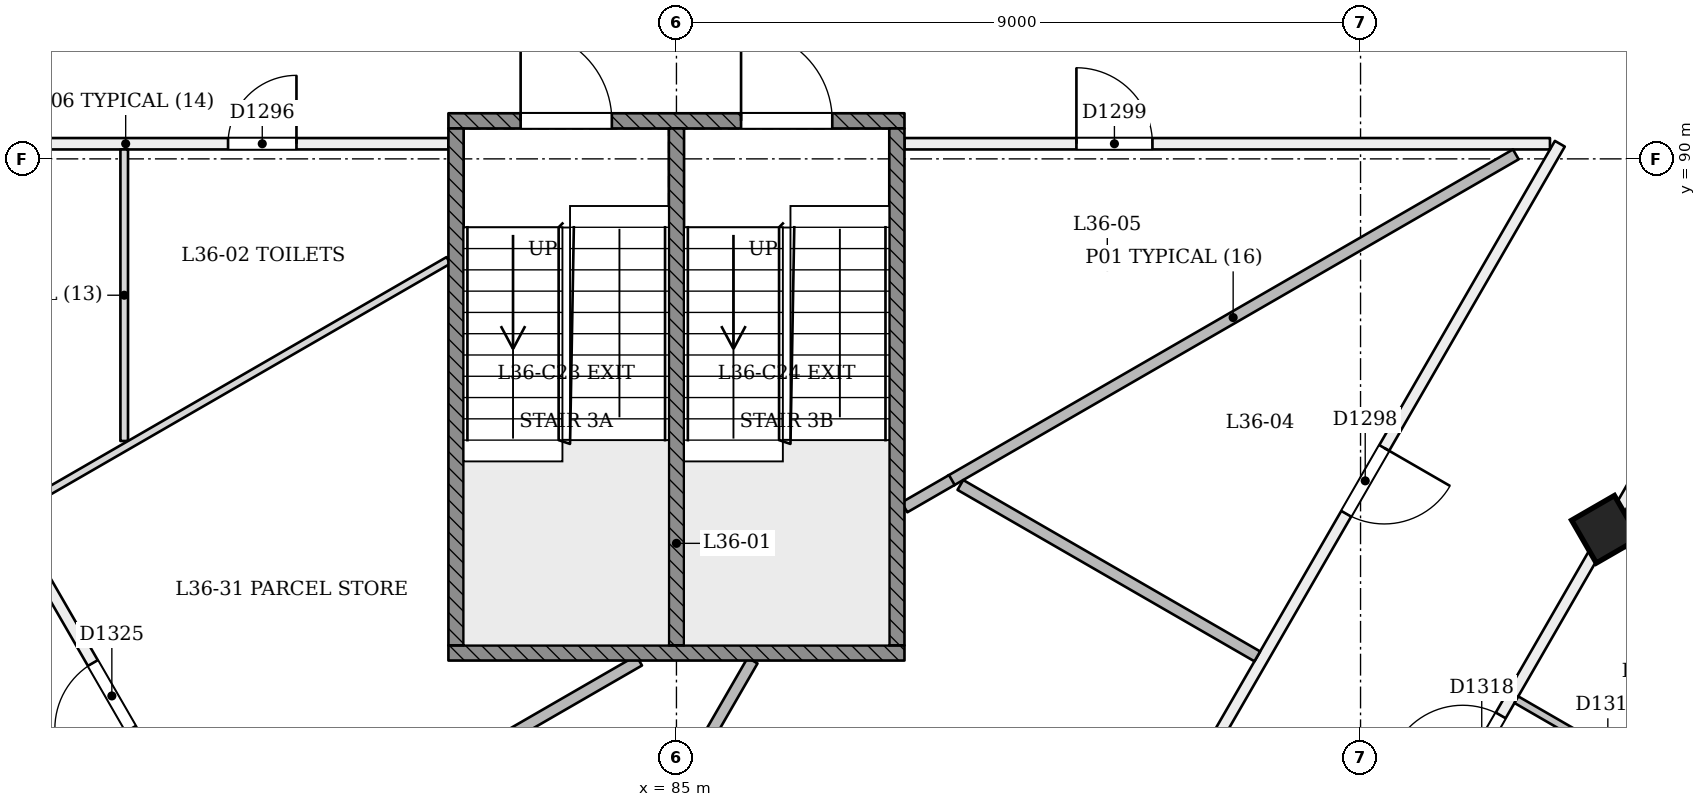
"""IFC4 building model, lengths in metres.
Left out: names, types, materials, properties, quantities, classifications, styles, units other than length and angle.
Written with IfcOpenShell. Run it as: python <this file> out.ifc"""

import sys

from ifc_helpers import new_model, si_unit, direction, frame, frame_2d, origin, origin_2d, place, context, subcontext, project, spatial, rectangle, extrude, element, fill, save


model = new_model("IFC4")
c1 = context("Model", 3, precision=1e-05, world=origin(), true_north=direction((0.0, 1.0)))
c2 = subcontext(c1, "Body", "Model", "MODEL_VIEW")
j1 = project(units=[si_unit("LENGTHUNIT", "METRE"), si_unit("PLANEANGLEUNIT", "RADIAN")], contexts=[c1])
p1 = place(None, origin())
s1 = spatial("IfcSite", under=j1, at=p1, CompositionType="ELEMENT")
p2 = place(p1, origin())
s2 = spatial("IfcBuilding", under=s1, at=p2, CompositionType="ELEMENT")
p3 = place(p2, frame((0.0, 0.0, 142.2)))
s3 = spatial("IfcBuildingStorey", under=s2, at=p3, CompositionType="ELEMENT", Elevation=142.2)
p4 = place(p3, frame((97.248, 85.08, -0.02), z_axis=(-0.02215369191, 0.038413282303, 0.999016333038), x_axis=(-0.500652774743, -0.865364202149, 0.022171981912)))
e1 = element("IfcColumn", 1, at=p4, inside=s3, PredefinedType="COLUMN", context=c2, shape_type="SweptSolid", body=[
    extrude(rectangle(XDim=0.65, YDim=0.65, at=origin_2d()), origin(), (0.0, 0.0, 1.0), 3.604),
])
p5 = place(p3, frame((73.508, 90.199, 0.0), z_axis=(0.0, 0.0, 1.0), x_axis=(1.0, 0.0, 0.0)))
e2 = element("IfcWall", 2, at=p5, inside=s3, PredefinedType="PARTITIONING", context=c2, shape_type="SweptSolid", body=[
    extrude(rectangle(XDim=8.492, YDim=0.15, at=frame_2d((4.246, 0.0))), origin(), (0.0, 0.0, 1.0), 3.15),
])
p6 = place(p5, frame((5.593, 0.0, 0.0)))
e3 = element("IfcOpeningElement", 3, at=p6, cuts=e2, PredefinedType="OPENING", context=c2, shape_type="SweptSolid", body=[
    extrude(rectangle(XDim=0.9, YDim=2.1, at=frame_2d((0.45, 1.05))), frame((0.0, 0.085, 0.0), z_axis=(0.0, -1.0, 0.0), x_axis=(1.0, 0.0, 0.0)), (0.0, 0.0, 1.0), 0.171),
])
p7 = place(p3, frame((96.622, 90.199, 0.0), z_axis=(0.0, 0.0, 1.0), x_axis=(-0.49999793811, -0.866026594214, 0.0)))
e4 = element("IfcWall", 4, at=p7, inside=s3, PredefinedType="PARTITIONING", context=c2, shape_type="SweptSolid", body=[
    extrude(rectangle(XDim=23.244, YDim=0.15, at=frame_2d((11.622, 0.0))), origin(), (0.0, 0.0, 1.0), 3.15),
])
p8 = place(p7, frame((4.621, 0.0, 0.0)))
e5 = element("IfcOpeningElement", 5, at=p8, cuts=e4, PredefinedType="OPENING", context=c2, shape_type="SweptSolid", body=[
    extrude(rectangle(XDim=1.0, YDim=2.1, at=frame_2d((0.5, 1.05))), frame((0.0, 0.085, 0.0), z_axis=(0.0, -1.0, 0.0), x_axis=(1.0, 0.0, 0.0)), (0.0, 0.0, 1.0), 0.171),
])
p9 = place(p7, frame((10.348, 0.0, 0.0)))
e6 = element("IfcOpeningElement", 6, at=p9, cuts=e4, PredefinedType="OPENING", context=c2, shape_type="SweptSolid", body=[
    extrude(rectangle(XDim=1.2, YDim=2.1, at=frame_2d((0.6, 1.05))), frame((0.0, 0.085, 0.0), z_axis=(0.0, -1.0, 0.0), x_axis=(1.0, 0.0, 0.0)), (0.0, 0.0, 1.0), 0.171),
])
p10 = place(p7, frame((15.389, 0.0, 0.0)))
e7 = element("IfcOpeningElement", 7, at=p10, cuts=e4, PredefinedType="OPENING", context=c2, shape_type="SweptSolid", body=[
    extrude(rectangle(XDim=1.0, YDim=2.1, at=frame_2d((0.5, 1.05))), frame((0.0, 0.085, 0.0), z_axis=(0.0, -1.0, 0.0), x_axis=(1.0, 0.0, 0.0)), (0.0, 0.0, 1.0), 0.171),
])
p11 = place(p7, frame((19.423, 0.0, 0.0)))
e8 = element("IfcOpeningElement", 8, at=p11, cuts=e4, PredefinedType="OPENING", context=c2, shape_type="SweptSolid", body=[
    extrude(rectangle(XDim=1.0, YDim=2.1, at=frame_2d((0.5, 1.05))), frame((0.0, 0.085, 0.0), z_axis=(0.0, -1.0, 0.0), x_axis=(1.0, 0.0, 0.0)), (0.0, 0.0, 1.0), 0.171),
])
p12 = place(p3, frame((88.0, 90.199, 0.0), z_axis=(0.0, 0.0, 1.0), x_axis=(1.0, 0.0, 0.0)))
e9 = element("IfcWall", 9, at=p12, inside=s3, PredefinedType="PARTITIONING", context=c2, shape_type="SweptSolid", body=[
    extrude(rectangle(XDim=8.492, YDim=0.15, at=frame_2d((4.246, 0.0))), origin(), (0.0, 0.0, 1.0), 3.15),
])
p13 = place(p12, frame((2.262, 0.0, 0.0)))
e10 = element("IfcOpeningElement", 10, at=p13, cuts=e9, PredefinedType="OPENING", context=c2, shape_type="SweptSolid", body=[
    extrude(rectangle(XDim=1.0, YDim=2.1, at=frame_2d((0.5, 1.05))), frame((0.0, 0.085, 0.0), z_axis=(0.0, -1.0, 0.0), x_axis=(1.0, 0.0, 0.0)), (0.0, 0.0, 1.0), 0.171),
])
p14 = place(p3, frame((64.449, 99.517, 0.0), z_axis=(0.0, 0.0, 1.0), x_axis=(0.499425839766, -0.866356641675, 0.0)))
e11 = element("IfcWall", 11, at=p14, inside=s3, PredefinedType="PARTITIONING", context=c2, shape_type="SweptSolid", body=[
    extrude(rectangle(XDim=41.118, YDim=0.15, at=frame_2d((20.559, 0.0))), origin(), (0.0, 0.0, 1.0), 2.75),
])
p15 = place(p14, frame((0.951, 0.0, 0.0)))
e12 = element("IfcOpeningElement", 12, at=p15, cuts=e11, PredefinedType="OPENING", context=c2, shape_type="SweptSolid", body=[
    extrude(rectangle(XDim=1.2, YDim=2.1, at=frame_2d((0.6, 1.05))), frame((0.0, 0.085, 0.0), z_axis=(0.0, -1.0, 0.0), x_axis=(1.0, 0.0, 0.0)), (0.0, 0.0, 1.0), 0.171),
])
p16 = place(p14, frame((10.552, 0.0, 0.0)))
e13 = element("IfcOpeningElement", 13, at=p16, cuts=e11, PredefinedType="OPENING", context=c2, shape_type="SweptSolid", body=[
    extrude(rectangle(XDim=1.0, YDim=2.1, at=frame_2d((0.5, 1.05))), frame((0.0, 0.085, 0.0), z_axis=(0.0, -1.0, 0.0), x_axis=(1.0, 0.0, 0.0)), (0.0, 0.0, 1.0), 0.171),
])
p17 = place(p14, frame((12.762, 0.0, 0.0)))
e14 = element("IfcOpeningElement", 14, at=p17, cuts=e11, PredefinedType="OPENING", context=c2, shape_type="SweptSolid", body=[
    extrude(rectangle(XDim=1.0, YDim=2.1, at=frame_2d((0.5, 1.05))), frame((0.0, 0.085, 0.0), z_axis=(0.0, -1.0, 0.0), x_axis=(1.0, 0.0, 0.0)), (0.0, 0.0, 1.0), 0.171),
])
p18 = place(p14, frame((20.557, 0.0, 0.0)))
e15 = element("IfcOpeningElement", 15, at=p18, cuts=e11, PredefinedType="OPENING", context=c2, shape_type="SweptSolid", body=[
    extrude(rectangle(XDim=1.2, YDim=2.1, at=frame_2d((0.6, 1.05))), frame((0.0, 0.085, 0.0), z_axis=(0.0, -1.0, 0.0), x_axis=(1.0, 0.0, 0.0)), (0.0, 0.0, 1.0), 0.171),
])
p19 = place(p14, frame((28.436, 0.0, 0.0)))
e16 = element("IfcOpeningElement", 16, at=p19, cuts=e11, PredefinedType="OPENING", context=c2, shape_type="SweptSolid", body=[
    extrude(rectangle(XDim=1.0, YDim=2.1, at=frame_2d((0.5, 1.05))), frame((0.0, 0.085, 0.0), z_axis=(0.0, -1.0, 0.0), x_axis=(1.0, 0.0, 0.0)), (0.0, 0.0, 1.0), 0.171),
])
p20 = place(p14, frame((32.957, 0.0, 0.0)))
e17 = element("IfcOpeningElement", 17, at=p20, cuts=e11, PredefinedType="OPENING", context=c2, shape_type="SweptSolid", body=[
    extrude(rectangle(XDim=1.2, YDim=2.1, at=frame_2d((0.6, 1.05))), frame((0.0, 0.085, 0.0), z_axis=(0.0, -1.0, 0.0), x_axis=(1.0, 0.0, 0.0)), (0.0, 0.0, 1.0), 0.171),
])
p21 = place(p14, frame((39.53, 0.0, 0.0)))
e18 = element("IfcOpeningElement", 18, at=p21, cuts=e11, PredefinedType="OPENING", context=c2, shape_type="SweptSolid", body=[
    extrude(rectangle(XDim=1.0, YDim=2.1, at=frame_2d((0.5, 1.05))), frame((0.0, 0.085, 0.0), z_axis=(0.0, -1.0, 0.0), x_axis=(1.0, 0.0, 0.0)), (0.0, 0.0, 1.0), 0.171),
])
p22 = place(p3, frame((85.065, 63.98, 0.0), z_axis=(0.0, 0.0, 1.0), x_axis=(0.499427357949, 0.866355766491, 0.0)))
e19 = element("IfcWall", 19, at=p22, inside=s3, PredefinedType="PARTITIONING", context=c2, shape_type="SweptSolid", body=[
    extrude(rectangle(XDim=41.02, YDim=0.15, at=frame_2d((20.51, 0.0))), origin(), (0.0, 0.0, 1.0), 2.75),
])
p23 = place(p22, frame((0.382, 0.0, 0.0)))
e20 = element("IfcOpeningElement", 20, at=p23, cuts=e19, PredefinedType="OPENING", context=c2, shape_type="SweptSolid", body=[
    extrude(rectangle(XDim=1.2, YDim=2.1, at=frame_2d((0.6, 1.05))), frame((0.0, 0.085, 0.0), z_axis=(0.0, -1.0, 0.0), x_axis=(1.0, 0.0, 0.0)), (0.0, 0.0, 1.0), 0.171),
])
p24 = place(p22, frame((2.583, 0.0, 0.0)))
e21 = element("IfcOpeningElement", 21, at=p24, cuts=e19, PredefinedType="OPENING", context=c2, shape_type="SweptSolid", body=[
    extrude(rectangle(XDim=1.0, YDim=2.1, at=frame_2d((0.5, 1.05))), frame((0.0, 0.085, 0.0), z_axis=(0.0, -1.0, 0.0), x_axis=(1.0, 0.0, 0.0)), (0.0, 0.0, 1.0), 0.171),
])
p25 = place(p22, frame((8.113, 0.0, 0.0)))
e22 = element("IfcOpeningElement", 22, at=p25, cuts=e19, PredefinedType="OPENING", context=c2, shape_type="SweptSolid", body=[
    extrude(rectangle(XDim=1.0, YDim=2.1, at=frame_2d((0.5, 1.05))), frame((0.0, 0.085, 0.0), z_axis=(0.0, -1.0, 0.0), x_axis=(1.0, 0.0, 0.0)), (0.0, 0.0, 1.0), 0.171),
])
p26 = place(p22, frame((11.467, 0.0, 0.0)))
e23 = element("IfcOpeningElement", 23, at=p26, cuts=e19, PredefinedType="OPENING", context=c2, shape_type="SweptSolid", body=[
    extrude(rectangle(XDim=1.0, YDim=2.1, at=frame_2d((0.5, 1.05))), frame((0.0, 0.085, 0.0), z_axis=(0.0, -1.0, 0.0), x_axis=(1.0, 0.0, 0.0)), (0.0, 0.0, 1.0), 0.171),
])
p27 = place(p22, frame((18.142, 0.0, 0.0)))
e24 = element("IfcOpeningElement", 24, at=p27, cuts=e19, PredefinedType="OPENING", context=c2, shape_type="SweptSolid", body=[
    extrude(rectangle(XDim=1.0, YDim=2.1, at=frame_2d((0.5, 1.05))), frame((0.0, 0.085, 0.0), z_axis=(0.0, -1.0, 0.0), x_axis=(1.0, 0.0, 0.0)), (0.0, 0.0, 1.0), 0.171),
])
p28 = place(p22, frame((20.583, 0.0, 0.0)))
e25 = element("IfcOpeningElement", 25, at=p28, cuts=e19, PredefinedType="OPENING", context=c2, shape_type="SweptSolid", body=[
    extrude(rectangle(XDim=1.0, YDim=2.1, at=frame_2d((0.5, 1.05))), frame((0.0, 0.085, 0.0), z_axis=(0.0, -1.0, 0.0), x_axis=(1.0, 0.0, 0.0)), (0.0, 0.0, 1.0), 0.171),
])
p29 = place(p22, frame((26.113, 0.0, 0.0)))
e26 = element("IfcOpeningElement", 26, at=p29, cuts=e19, PredefinedType="OPENING", context=c2, shape_type="SweptSolid", body=[
    extrude(rectangle(XDim=1.0, YDim=2.1, at=frame_2d((0.5, 1.05))), frame((0.0, 0.085, 0.0), z_axis=(0.0, -1.0, 0.0), x_axis=(1.0, 0.0, 0.0)), (0.0, 0.0, 1.0), 0.171),
])
p30 = place(p22, frame((33.863, 0.0, 0.0)))
e27 = element("IfcOpeningElement", 27, at=p30, cuts=e19, PredefinedType="OPENING", context=c2, shape_type="SweptSolid", body=[
    extrude(rectangle(XDim=1.2, YDim=2.1, at=frame_2d((0.6, 1.05))), frame((0.0, 0.085, 0.0), z_axis=(0.0, -1.0, 0.0), x_axis=(1.0, 0.0, 0.0)), (0.0, 0.0, 1.0), 0.171),
])
p31 = place(p22, frame((39.545, 0.0, 0.0)))
e28 = element("IfcOpeningElement", 28, at=p31, cuts=e19, PredefinedType="OPENING", context=c2, shape_type="SweptSolid", body=[
    extrude(rectangle(XDim=1.2, YDim=2.1, at=frame_2d((0.6, 1.05))), frame((0.0, 0.085, 0.0), z_axis=(0.0, -1.0, 0.0), x_axis=(1.0, 0.0, 0.0)), (0.0, 0.0, 1.0), 0.171),
])
p32 = place(p3, frame((84.935, 70.181, 0.0), z_axis=(0.0, 0.0, 1.0), x_axis=(-0.499999181911, 0.866025876108, 0.0)))
e29 = element("IfcWall", 29, at=p32, inside=s3, PredefinedType="PARTITIONING", context=c2, shape_type="SweptSolid", body=[
    extrude(rectangle(XDim=23.114, YDim=0.15, at=frame_2d((11.557, 0.0))), origin(), (0.0, 0.0, 1.0), 3.15),
])
p33 = place(p32, frame((19.637, 0.0, 0.0)))
e30 = element("IfcOpeningElement", 30, at=p33, cuts=e29, PredefinedType="OPENING", context=c2, shape_type="SweptSolid", body=[
    extrude(rectangle(XDim=0.9, YDim=2.1, at=frame_2d((0.45, 1.05))), frame((0.0, 0.085, 0.0), z_axis=(0.0, -1.0, 0.0), x_axis=(1.0, 0.0, 0.0)), (0.0, 0.0, 1.0), 0.171),
])
p34 = place(p32, frame((14.226, 0.0, 0.0)))
e31 = element("IfcOpeningElement", 31, at=p34, cuts=e29, PredefinedType="OPENING", context=c2, shape_type="SweptSolid", body=[
    extrude(rectangle(XDim=1.0, YDim=2.1, at=frame_2d((0.5, 1.05))), frame((0.0, 0.085, 0.0), z_axis=(0.0, -1.0, 0.0), x_axis=(1.0, 0.0, 0.0)), (0.0, 0.0, 1.0), 0.171),
])
p35 = place(p32, frame((9.397, 0.0, 0.0)))
e32 = element("IfcOpeningElement", 32, at=p35, cuts=e29, PredefinedType="OPENING", context=c2, shape_type="SweptSolid", body=[
    extrude(rectangle(XDim=1.0, YDim=2.1, at=frame_2d((0.5, 1.05))), frame((0.0, 0.085, 0.0), z_axis=(0.0, -1.0, 0.0), x_axis=(1.0, 0.0, 0.0)), (0.0, 0.0, 1.0), 0.171),
])
p36 = place(p3, frame((77.735, 90.124, 0.0), z_axis=(0.0, 0.0, 1.0), x_axis=(0.0, -1.0, 0.0)))
e33 = element("IfcWall", 33, at=p36, inside=s3, PredefinedType="PARTITIONING", context=c2, shape_type="SweptSolid", body=[
    extrude(rectangle(XDim=3.836, YDim=0.1, at=frame_2d((1.918, 0.0))), origin(), (0.0, 0.0, 1.0), 3.15),
])
p37 = place(p3, frame((76.263, 85.352, 0.0), z_axis=(0.0, 0.0, 1.0), x_axis=(0.866027860944, 0.49999574405, 0.0)))
e34 = element("IfcWall", 34, at=p37, inside=s3, PredefinedType="PARTITIONING", context=c2, shape_type="SweptSolid", body=[
    extrude(rectangle(XDim=6.625, YDim=0.1, at=frame_2d((3.312, 0.0))), origin(), (0.0, 0.0, 1.0), 3.15),
])
p38 = place(p3, frame((96.043, 90.059, 0.0), z_axis=(0.0, 0.0, 1.0), x_axis=(-0.86602320337, -0.50000381121, 0.0)))
e35 = element("IfcWall", 35, at=p38, inside=s3, PredefinedType="PARTITIONING", context=c2, shape_type="SweptSolid", body=[
    extrude(rectangle(XDim=8.588, YDim=0.15, at=frame_2d((4.294, 0.0))), origin(), (0.0, 0.0, 1.0), 3.15),
])
p39 = place(p3, frame((88.735, 85.71, 0.0), z_axis=(0.0, 0.0, 1.0), x_axis=(0.866029661101, -0.499992626039, 0.0)))
e36 = element("IfcWall", 36, at=p39, inside=s3, PredefinedType="PARTITIONING", context=c2, shape_type="SweptSolid", body=[
    extrude(rectangle(XDim=4.511, YDim=0.15, at=frame_2d((2.255, 0.0))), origin(), (0.0, 0.0, 1.0), 3.15),
])
p40 = place(p3, frame((88.0, 85.416, 0.0), z_axis=(0.0, 0.0, 1.0), x_axis=(0.865999022067, 0.500045691691, 0.0)))
e37 = element("IfcWall", 37, at=p40, inside=s3, PredefinedType="PARTITIONING", context=c2, shape_type="SweptSolid", body=[
    extrude(rectangle(XDim=0.719, YDim=0.15, at=frame_2d((0.36, 0.0))), origin(), (0.0, 0.0, 1.0), 3.15),
])
p41 = place(p3, frame((98.509, 81.466, 0.0), z_axis=(0.0, 0.0, 1.0), x_axis=(-0.866049574308, 0.499958133088, 0.0)))
e38 = element("IfcWall", 38, at=p41, inside=s3, PredefinedType="PARTITIONING", context=c2, shape_type="SweptSolid", body=[
    extrude(rectangle(XDim=2.84, YDim=0.1, at=frame_2d((1.42, 0.0))), origin(), (0.0, 0.0, 1.0), 3.15),
])
p42 = place(p41, frame((1.0, 0.0, 0.0)))
e39 = element("IfcOpeningElement", 39, at=p42, cuts=e38, PredefinedType="OPENING", context=c2, shape_type="SweptSolid", body=[
    extrude(rectangle(XDim=0.9, YDim=2.1, at=frame_2d((0.45, 1.05))), frame((0.0, 0.061, 0.0), z_axis=(0.0, -1.0, 0.0), x_axis=(1.0, 0.0, 0.0)), (0.0, 0.0, 1.0), 0.121),
])
p43 = place(p3, frame((102.79, 81.881, 0.0), z_axis=(0.0, 0.0, 1.0), x_axis=(-0.866024019333, 0.500002397932, 0.0)))
e40 = element("IfcWall", 40, at=p43, inside=s3, PredefinedType="PARTITIONING", context=c2, shape_type="SweptSolid", body=[
    extrude(rectangle(XDim=6.341, YDim=0.1, at=frame_2d((3.171, 0.0))), origin(), (0.0, 0.0, 1.0), 2.65),
])
p44 = place(p3, frame((79.17, 80.317, 0.0), z_axis=(0.0, 0.0, 1.0), x_axis=(0.866036555756, 0.499980683721, 0.0)))
e41 = element("IfcWall", 41, at=p44, inside=s3, PredefinedType="PARTITIONING", context=c2, shape_type="SweptSolid", body=[
    extrude(rectangle(XDim=6.165, YDim=0.15, at=frame_2d((3.083, 0.0))), origin(), (0.0, 0.0, 1.0), 3.15),
])
p45 = place(p3, frame((86.002, 83.4, 0.0), z_axis=(0.0, 0.0, 1.0), x_axis=(-0.500003823521, -0.866023196262, 0.0)))
e42 = element("IfcWall", 42, at=p45, inside=s3, PredefinedType="PARTITIONING", context=c2, shape_type="SweptSolid", body=[
    extrude(rectangle(XDim=6.835, YDim=0.15, at=frame_2d((3.417, 0.0))), origin(), (0.0, 0.0, 1.0), 3.15),
])
p46 = place(p3, frame((82.0, 90.5, 0.0), z_axis=(0.0, 0.0, 1.0), x_axis=(1.0, 0.0, 0.0)))
e43 = element("IfcWall", 43, at=p46, inside=s3, PredefinedType="SOLIDWALL", context=c2, shape_type="SweptSolid", body=[
    extrude(rectangle(XDim=6.0, YDim=0.2, at=frame_2d((3.0, 0.0))), origin(), (0.0, 0.0, 1.0), 3.15),
])
p47 = place(p46, frame((0.95, 0.0, 0.0)))
e44 = element("IfcOpeningElement", 44, at=p47, cuts=e43, PredefinedType="OPENING", context=c2, shape_type="SweptSolid", body=[
    extrude(rectangle(XDim=1.2, YDim=2.1, at=frame_2d((0.6, 1.05))), frame((0.0, 0.11, 0.0), z_axis=(0.0, -1.0, 0.0), x_axis=(1.0, 0.0, 0.0)), (0.0, 0.0, 1.0), 0.221),
])
p48 = place(p46, frame((3.85, 0.0, 0.0)))
e45 = element("IfcOpeningElement", 45, at=p48, cuts=e43, PredefinedType="OPENING", context=c2, shape_type="SweptSolid", body=[
    extrude(rectangle(XDim=1.2, YDim=2.1, at=frame_2d((0.6, 1.05))), frame((0.0, 0.11, 0.0), z_axis=(0.0, -1.0, 0.0), x_axis=(1.0, 0.0, 0.0)), (0.0, 0.0, 1.0), 0.221),
])
p49 = place(p3, frame((82.0, 83.5, 0.0), z_axis=(0.0, 0.0, 1.0), x_axis=(1.0, 0.0, 0.0)))
e46 = element("IfcWall", 46, at=p49, inside=s3, PredefinedType="SOLIDWALL", context=c2, shape_type="SweptSolid", body=[
    extrude(rectangle(XDim=6.0, YDim=0.2, at=frame_2d((3.0, 0.0))), origin(), (0.0, 0.0, 1.0), 3.15),
])
for number, where, z_axis, x_axis in (
    (47, (82.1, 83.6, 0.0), (0.0, 0.0, 1.0), (0.0, 1.0, 0.0)),
    (48, (87.9, 83.6, 0.0), (0.0, 0.0, 1.0), (0.0, 1.0, 0.0)),
    (49, (85.0, 83.6, 0.0), (0.0, 0.0, 1.0), (0.0, 1.0, 0.0)),
):
    element("IfcWall", number, at=place(p3, frame(where, z_axis=z_axis, x_axis=x_axis)), inside=s3, PredefinedType="SOLIDWALL", context=c2, shape_type="SweptSolid", body=[
        extrude(rectangle(XDim=6.8, YDim=0.2, at=frame_2d((3.4, 0.0))), origin(), (0.0, 0.0, 1.0), 3.15),
    ])
p50 = place(p6, origin())
e50 = element("IfcDoor", 50, at=p50, inside=s3, OperationType="SINGLE_SWING_RIGHT", PredefinedType="NOTDEFINED", context=c2, shape_type="SweptSolid", body=[
    extrude(rectangle(XDim=0.9, YDim=2.1, at=frame_2d((0.45, 1.05))), frame((0.0, 0.025, 0.0), z_axis=(0.0, -1.0, 0.0), x_axis=(1.0, 0.0, 0.0)), (0.0, 0.0, 1.0), 0.05),
])
fill(e3, e50)
p51 = place(p8, origin())
e51 = element("IfcDoor", 51, at=p51, inside=s3, OperationType="SINGLE_SWING_LEFT", PredefinedType="NOTDEFINED", context=c2, shape_type="SweptSolid", body=[
    extrude(rectangle(XDim=1.0, YDim=2.1, at=frame_2d((0.5, 1.05))), frame((0.0, 0.025, 0.0), z_axis=(0.0, -1.0, 0.0), x_axis=(1.0, 0.0, 0.0)), (0.0, 0.0, 1.0), 0.05),
])
fill(e5, e51)
p52 = place(p13, origin())
e52 = element("IfcDoor", 52, at=p52, inside=s3, OperationType="SINGLE_SWING_LEFT", PredefinedType="NOTDEFINED", context=c2, shape_type="SweptSolid", body=[
    extrude(rectangle(XDim=1.0, YDim=2.1, at=frame_2d((0.5, 1.05))), frame((0.0, 0.025, 0.0), z_axis=(0.0, -1.0, 0.0), x_axis=(1.0, 0.0, 0.0)), (0.0, 0.0, 1.0), 0.05),
])
fill(e10, e52)
p53 = place(p28, origin())
e53 = element("IfcDoor", 53, at=p53, inside=s3, OperationType="SINGLE_SWING_LEFT", PredefinedType="NOTDEFINED", context=c2, shape_type="SweptSolid", body=[
    extrude(rectangle(XDim=1.0, YDim=2.1, at=frame_2d((0.5, 1.05))), frame((0.0, 0.025, 0.0), z_axis=(0.0, -1.0, 0.0), x_axis=(1.0, 0.0, 0.0)), (0.0, 0.0, 1.0), 0.05),
])
fill(e25, e53)
p54 = place(p34, origin())
e54 = element("IfcDoor", 54, at=p54, inside=s3, OperationType="SINGLE_SWING_LEFT", PredefinedType="NOTDEFINED", context=c2, shape_type="SweptSolid", body=[
    extrude(rectangle(XDim=1.0, YDim=2.1, at=frame_2d((0.5, 1.05))), frame((0.0, 0.025, 0.0), z_axis=(0.0, -1.0, 0.0), x_axis=(1.0, 0.0, 0.0)), (0.0, 0.0, 1.0), 0.05),
])
fill(e31, e54)
p55 = place(p47, origin())
e55 = element("IfcDoor", 55, at=p55, inside=s3, OperationType="SINGLE_SWING_LEFT", PredefinedType="NOTDEFINED", context=c2, shape_type="SweptSolid", body=[
    extrude(rectangle(XDim=1.2, YDim=2.1, at=frame_2d((0.6, 1.05))), frame((0.0, 0.025, 0.0), z_axis=(0.0, -1.0, 0.0), x_axis=(1.0, 0.0, 0.0)), (0.0, 0.0, 1.0), 0.05),
])
fill(e44, e55)
p56 = place(p48, origin())
e56 = element("IfcDoor", 56, at=p56, inside=s3, OperationType="SINGLE_SWING_LEFT", PredefinedType="NOTDEFINED", context=c2, shape_type="SweptSolid", body=[
    extrude(rectangle(XDim=1.2, YDim=2.1, at=frame_2d((0.6, 1.05))), frame((0.0, 0.025, 0.0), z_axis=(0.0, -1.0, 0.0), x_axis=(1.0, 0.0, 0.0)), (0.0, 0.0, 1.0), 0.05),
])
fill(e45, e56)
save(model, sys.argv[1])
